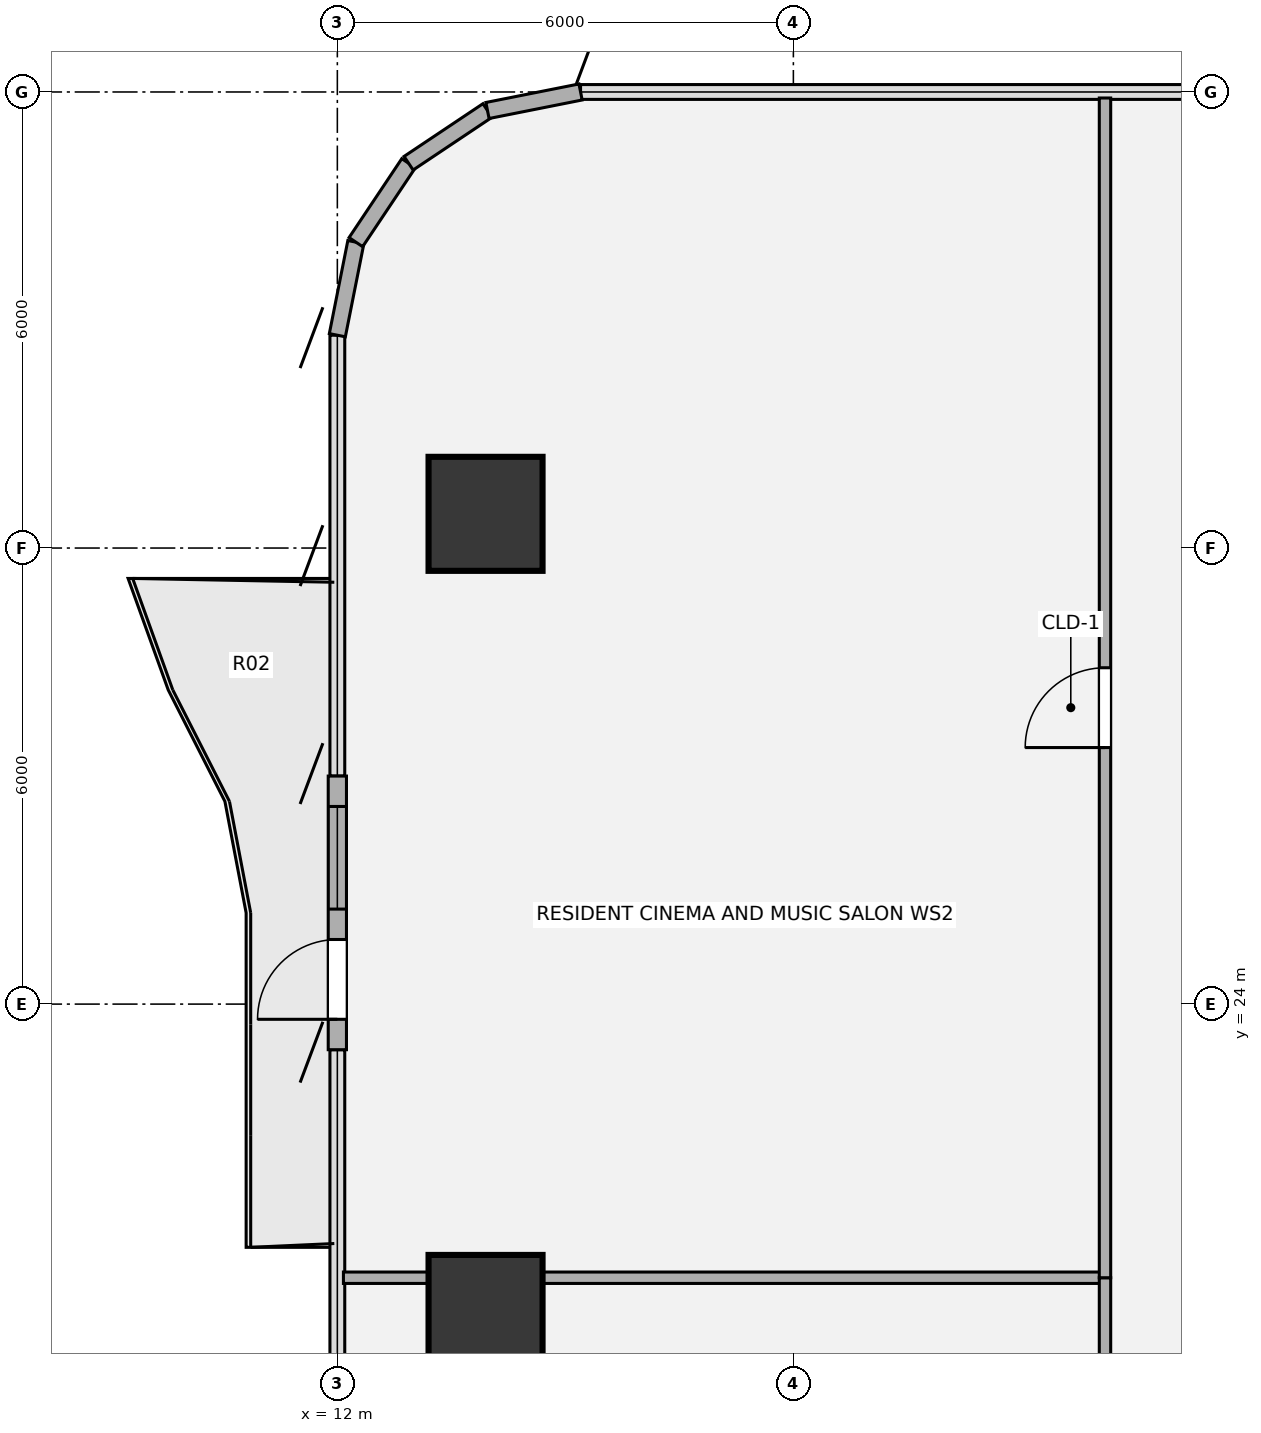
"""IFC4 building model, lengths in metres.
Left out: names, types, materials, properties, quantities, classifications, styles, units other than length and angle.
Written with IfcOpenShell. Run it as: python <this file> out.ifc"""

import sys

from ifc_helpers import new_model, si_unit, direction, frame, frame_2d, origin, origin_2d, place, context, subcontext, project, spatial, rectangle, hollow_circle, extrude, source, transform, mapped, element, fill, save


model = new_model("IFC4")
c1 = context("Model", 3, precision=1e-05, world=origin(), true_north=direction((0.0, 1.0)))
c2 = subcontext(c1, "Body", "Model", "MODEL_VIEW")
j1 = project(units=[si_unit("LENGTHUNIT", "METRE"), si_unit("PLANEANGLEUNIT", "RADIAN")], contexts=[c1])
p1 = place(None, origin())
s1 = spatial("IfcSite", under=j1, at=p1, CompositionType="ELEMENT")
p2 = place(p1, origin())
s2 = spatial("IfcBuilding", under=s1, at=p2, CompositionType="ELEMENT")
p3 = place(p2, frame((0.0, 0.0, 57.24)))
s3 = spatial("IfcBuildingStorey", under=s2, at=p3, CompositionType="ELEMENT", Elevation=57.24)
m1 = source(origin(), c2, "Body", "SweptSolid", [
    extrude(hollow_circle(Radius=0.75, WallThickness=0.05, at=origin_2d()), origin(), (0.0, 0.0, 1.0), 3.78),
])
for number, where, z_axis, x_axis in (
    (1, (13.95, 19.95, 0.0), (0.0, 0.0, 1.0), (1.0, 0.0, 0.0)),
    (2, (13.95, 30.45, 0.0), (0.0, 0.0, 1.0), (1.0, 0.0, 0.0)),
):
    element("IfcColumn", number, at=place(p3, frame(where, z_axis=z_axis, x_axis=x_axis)), inside=s3, PredefinedType="COLUMN", context=c2, shape_type="MappedRepresentation", body=[
        mapped(m1, transform((0.0, 0.0, 0.0), x_axis=(1.0, 0.0, 0.0), y_axis=(0.0, 1.0, 0.0), z_axis=(0.0, 0.0, 1.0), scale=1.0)),
    ])
p4 = place(p3, frame((12.0, 23.4, 0.0), z_axis=(0.0, 0.0, 1.0), x_axis=(0.0, 1.0, 0.0)))
e3 = element("IfcWall", 3, at=p4, inside=s3, PredefinedType="SOLIDWALL", context=c2, shape_type="SweptSolid", body=[
    extrude(rectangle(XDim=3.6, YDim=0.24, at=frame_2d((1.8, 0.0))), origin(), (0.0, 0.0, 1.0), 3.53),
])
p5 = place(p4, frame((0.4, 0.0, 0.0)))
e4 = element("IfcOpeningElement", 4, at=p5, cuts=e3, PredefinedType="OPENING", context=c2, shape_type="SweptSolid", body=[
    extrude(rectangle(XDim=1.05, YDim=2.15, at=origin_2d()), frame((0.525, 0.13, 1.075), z_axis=(0.0, -1.0, 0.0), x_axis=(1.0, 0.0, 0.0)), (0.0, 0.0, 1.0), 0.26),
])
p6 = place(p4, frame((1.85, 0.0, 0.85)))
e5 = element("IfcOpeningElement", 5, at=p6, cuts=e3, PredefinedType="OPENING", context=c2, shape_type="SweptSolid", body=[
    extrude(rectangle(XDim=1.35, YDim=1.35, at=origin_2d()), frame((0.675, 0.13, 0.675), z_axis=(0.0, -1.0, 0.0), x_axis=(1.0, 0.0, 0.0)), (0.0, 0.0, 1.0), 0.26),
])
for number, where, z_axis, x_axis in (
    (6, (12.0, 32.8, 0.0), (0.0, 0.0, 1.0), (0.195, 0.981, 0.0)),
    (7, (12.244, 34.025, 0.0), (0.0, 0.0, 1.0), (0.556, 0.831, 0.0)),
    (8, (12.937, 35.063, 0.0), (0.0, 0.0, 1.0), (0.831, 0.556, 0.0)),
    (9, (13.975, 35.756, 0.0), (0.0, 0.0, 1.0), (0.981, 0.195, 0.0)),
):
    element("IfcWall", number, at=place(p3, frame(where, z_axis=z_axis, x_axis=x_axis)), inside=s3, PredefinedType="SOLIDWALL", context=c2, shape_type="SweptSolid", body=[
        extrude(rectangle(XDim=1.249, YDim=0.215, at=frame_2d((0.624, 0.0))), origin(), (0.0, 0.0, 1.0), 3.53),
    ])
p7 = place(p3, frame((12.08, 20.4, 0.0), z_axis=(0.0, 0.0, 1.0), x_axis=(1.0, 0.0, 0.0)))
e10 = element("IfcWall", 10, at=p7, inside=s3, PredefinedType="PARTITIONING", context=c2, shape_type="SweptSolid", body=[
    extrude(rectangle(XDim=10.02, YDim=0.15, at=frame_2d((5.01, 0.0))), origin(), (0.0, 0.0, 1.0), 2.982),
])
p8 = place(p3, frame((22.1, 6.08, 0.0), z_axis=(0.0, 0.0, 1.0), x_axis=(0.0, 1.0, 0.0)))
e11 = element("IfcWall", 11, at=p8, inside=s3, PredefinedType="PARTITIONING", context=c2, shape_type="SweptSolid", body=[
    extrude(rectangle(XDim=14.32, YDim=0.15, at=frame_2d((7.16, 0.0))), origin(), (0.0, 0.0, 1.0), 3.5),
])
p9 = place(p8, frame((6.635, 0.0, 0.0)))
e12 = element("IfcOpeningElement", 12, at=p9, cuts=e11, PredefinedType="OPENING", context=c2, shape_type="SweptSolid", body=[
    extrude(rectangle(XDim=1.05, YDim=2.1, at=origin_2d()), frame((0.525, 0.085, 1.05), z_axis=(0.0, -1.0, 0.0), x_axis=(1.0, 0.0, 0.0)), (0.0, 0.0, 1.0), 0.17),
])
p10 = place(p3, frame((22.1, 20.4, 0.0), z_axis=(0.0, 0.0, 1.0), x_axis=(0.0, 1.0, 0.0)))
e13 = element("IfcWall", 13, at=p10, inside=s3, PredefinedType="PARTITIONING", context=c2, shape_type="SweptSolid", body=[
    extrude(rectangle(XDim=15.521, YDim=0.15, at=frame_2d((7.76, 0.0))), origin(), (0.0, 0.0, 1.0), 3.5),
])
p11 = place(p10, frame((6.975, 0.0, 0.0)))
e14 = element("IfcOpeningElement", 14, at=p11, cuts=e13, PredefinedType="OPENING", context=c2, shape_type="SweptSolid", body=[
    extrude(rectangle(XDim=1.05, YDim=2.1, at=origin_2d()), frame((0.525, 0.085, 1.05), z_axis=(0.0, -1.0, 0.0), x_axis=(1.0, 0.0, 0.0)), (0.0, 0.0, 1.0), 0.17),
])
m2 = source(origin(), c2, "Body", "SweptSolid", [
    extrude(rectangle(XDim=1.05, YDim=2.15, at=origin_2d()), frame((0.525, 0.025, 1.075), z_axis=(0.0, -1.0, 0.0), x_axis=(1.0, 0.0, 0.0)), (0.0, 0.0, 1.0), 0.05),
])
p12 = place(p5, origin())
e15 = element("IfcDoor", 15, at=p12, inside=s3, OperationType="SINGLE_SWING_LEFT", PredefinedType="DOOR", context=c2, shape_type="MappedRepresentation", body=[
    mapped(m2, transform((0.0, 0.0, 0.0), x_axis=(1.0, 0.0, 0.0), y_axis=(0.0, 1.0, 0.0), z_axis=(0.0, 0.0, 1.0), scale=1.0)),
])
fill(e4, e15)
m3 = source(origin(), c2, "Body", "SweptSolid", [
    extrude(rectangle(XDim=1.35, YDim=1.35, at=origin_2d()), frame((0.675, 0.03, 0.675), z_axis=(0.0, -1.0, 0.0), x_axis=(1.0, 0.0, 0.0)), (0.0, 0.0, 1.0), 0.06),
])
p13 = place(p6, origin())
e16 = element("IfcWindow", 16, at=p13, inside=s3, PartitioningType="SINGLE_PANEL", PredefinedType="WINDOW", context=c2, shape_type="MappedRepresentation", body=[
    mapped(m3, transform((0.0, 0.0, 0.0), x_axis=(1.0, 0.0, 0.0), y_axis=(0.0, 1.0, 0.0), z_axis=(0.0, 0.0, 1.0), scale=1.0)),
])
fill(e5, e16)
m4 = source(origin(), c2, "Body", "SweptSolid", [
    extrude(rectangle(XDim=1.05, YDim=2.1, at=origin_2d()), frame((0.525, 0.025, 1.05), z_axis=(0.0, -1.0, 0.0), x_axis=(1.0, 0.0, 0.0)), (0.0, 0.0, 1.0), 0.05),
])
p14 = place(p11, origin())
e17 = element("IfcDoor", 17, at=p14, inside=s3, OperationType="SINGLE_SWING_LEFT", PredefinedType="DOOR", context=c2, shape_type="MappedRepresentation", body=[
    mapped(m4, transform((0.0, 0.0, 0.0), x_axis=(1.0, 0.0, 0.0), y_axis=(0.0, 1.0, 0.0), z_axis=(0.0, 0.0, 1.0), scale=1.0)),
])
fill(e14, e17)
save(model, sys.argv[1])
